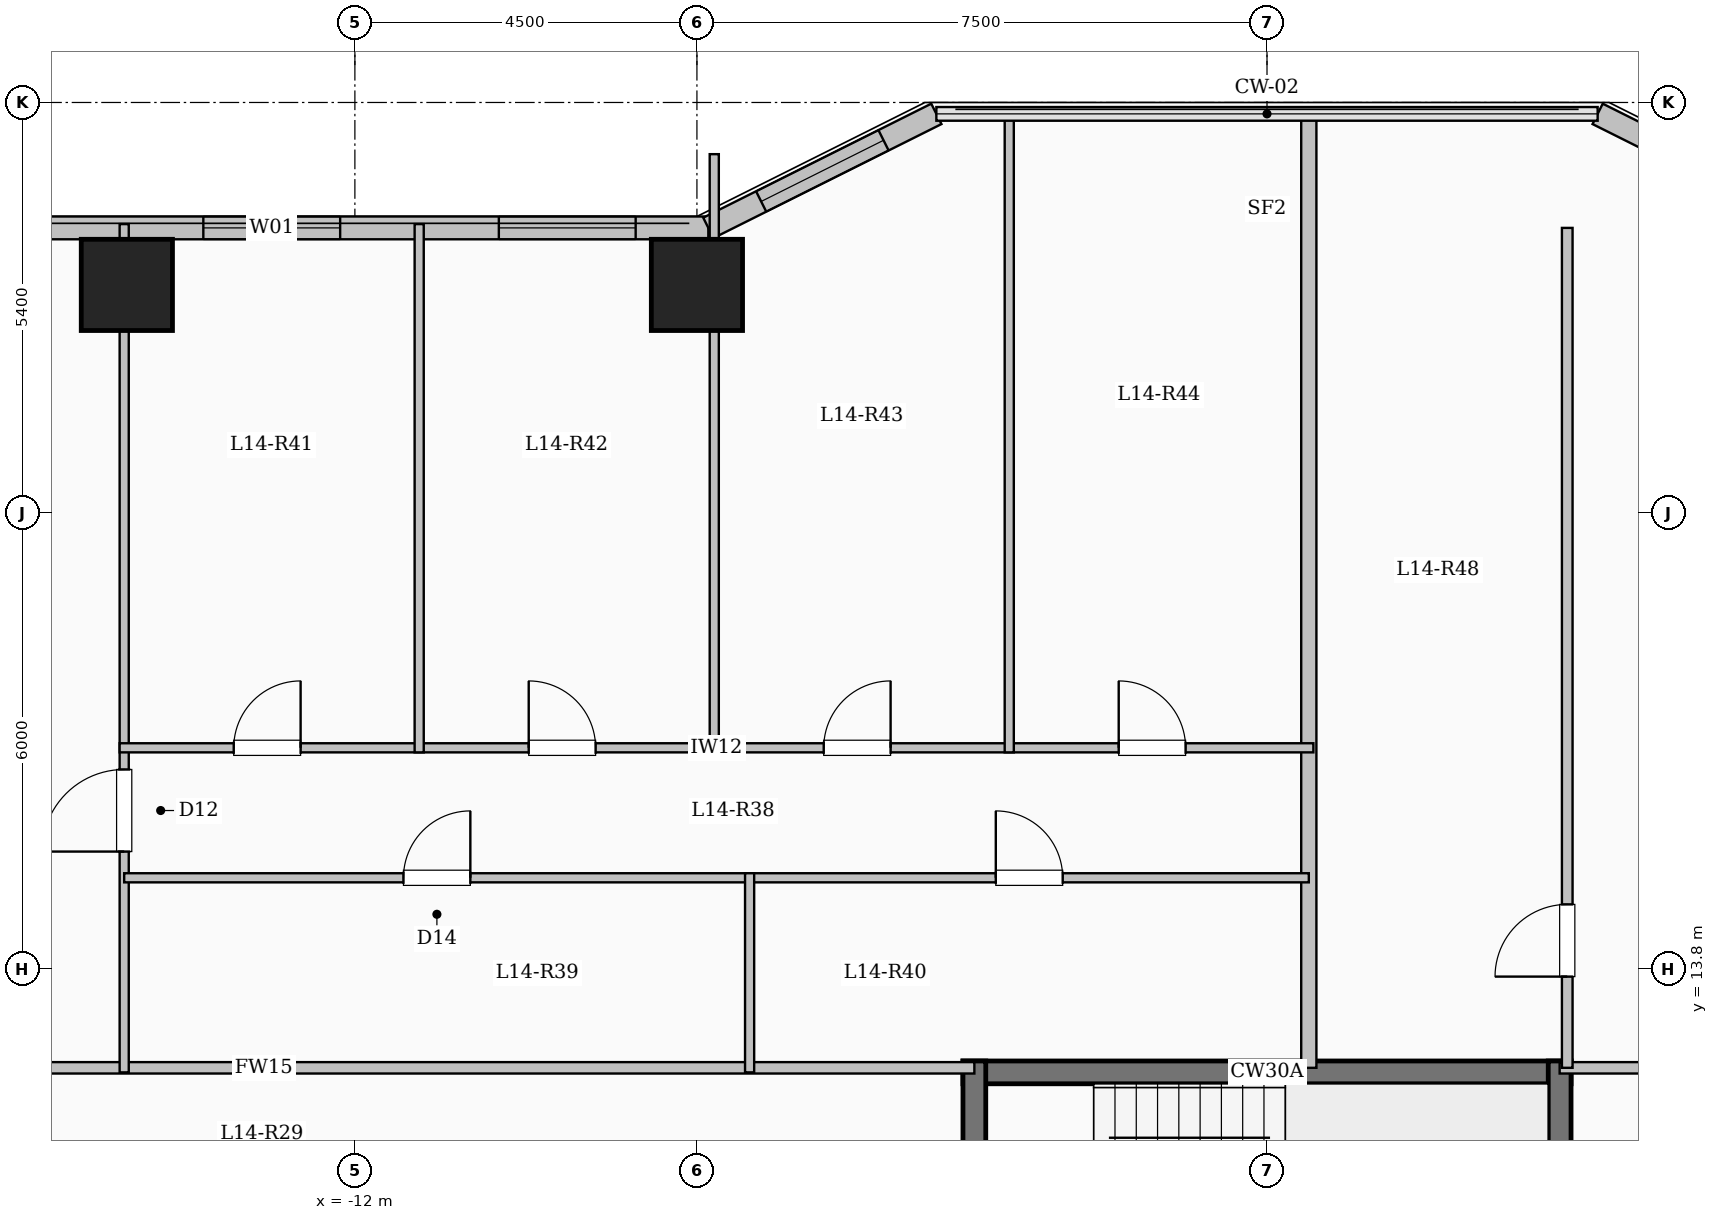
"""IFC4 building model, lengths in metres.
Left out: names, types, materials, properties, quantities, classifications, styles, units other than length and angle.
Written with IfcOpenShell. Run it as: python <this file> out.ifc"""

import sys

from ifc_helpers import new_model, si_unit, direction, frame, frame_2d, origin, origin_2d, place, context, subcontext, project, spatial, rectangle, extrude, element, fill, save


model = new_model("IFC4")
c1 = context("Model", 3, precision=1e-05, world=origin(), true_north=direction((0.0, 1.0)))
c2 = subcontext(c1, "Body", "Model", "MODEL_VIEW")
j1 = project(units=[si_unit("LENGTHUNIT", "METRE"), si_unit("PLANEANGLEUNIT", "RADIAN")], contexts=[c1])
p1 = place(None, origin())
s1 = spatial("IfcSite", under=j1, at=p1, CompositionType="ELEMENT")
p2 = place(p1, origin())
s2 = spatial("IfcBuilding", under=s1, at=p2, CompositionType="ELEMENT")
p3 = place(p2, frame((0.0, 0.0, 54.15)))
s3 = spatial("IfcBuildingStorey", under=s2, at=p3, CompositionType="ELEMENT", Elevation=54.15)
for number, where, z_axis, x_axis in (
    (1, (-15.0, 22.8, 0.0), (0.0, 0.0, 1.0), (1.0, 0.0, 0.0)),
    (2, (-7.5, 22.8, 0.0), (0.0, 0.0, 1.0), (1.0, 0.0, 0.0)),
):
    element("IfcColumn", number, at=place(p3, frame(where, z_axis=z_axis, x_axis=x_axis)), inside=s3, PredefinedType="COLUMN", context=c2, shape_type="SweptSolid", body=[
        extrude(rectangle(XDim=1.2, YDim=1.2, at=origin_2d()), origin(), (0.0, 0.0, 1.0), 3.35),
    ])
p4 = place(p3, frame((-22.65, 23.55, 0.0), z_axis=(0.0, 0.0, 1.0), x_axis=(1.0, 0.0, 0.0)))
e3 = element("IfcWall", 3, at=p4, inside=s3, PredefinedType="SOLIDWALL", context=c2, shape_type="SweptSolid", body=[
    extrude(rectangle(XDim=15.3, YDim=0.3, at=frame_2d((7.65, 0.0))), origin(), (0.0, 0.0, 1.0), 3.1),
])
p5 = place(p4, frame((2.637, 0.0, 0.9)))
e4 = element("IfcOpeningElement", 4, at=p5, cuts=e3, PredefinedType="OPENING", context=c2, shape_type="SweptSolid", body=[
    extrude(rectangle(XDim=2.4, YDim=1.8, at=frame_2d((1.2, 0.9))), frame((0.0, 0.16, 0.0), z_axis=(0.0, -1.0, 0.0), x_axis=(1.0, 0.0, 0.0)), (0.0, 0.0, 1.0), 0.32),
])
p6 = place(p4, frame((8.656, 0.0, 0.9)))
e5 = element("IfcOpeningElement", 5, at=p6, cuts=e3, PredefinedType="OPENING", context=c2, shape_type="SweptSolid", body=[
    extrude(rectangle(XDim=1.8, YDim=1.65, at=frame_2d((0.9, 0.825))), frame((0.0, 0.16, 0.0), z_axis=(0.0, -1.0, 0.0), x_axis=(1.0, 0.0, 0.0)), (0.0, 0.0, 1.0), 0.32),
])
p7 = place(p4, frame((12.544, 0.0, 0.9)))
e6 = element("IfcOpeningElement", 6, at=p7, cuts=e3, PredefinedType="OPENING", context=c2, shape_type="SweptSolid", body=[
    extrude(rectangle(XDim=1.8, YDim=1.65, at=frame_2d((0.9, 0.825))), frame((0.0, 0.16, 0.0), z_axis=(0.0, -1.0, 0.0), x_axis=(1.0, 0.0, 0.0)), (0.0, 0.0, 1.0), 0.32),
])
p8 = place(p3, frame((-7.35, 23.55, 0.0), z_axis=(0.0, 0.0, 1.0), x_axis=(0.894427191, 0.4472135955, 0.0)))
e7 = element("IfcWall", 7, at=p8, inside=s3, PredefinedType="SOLIDWALL", context=c2, shape_type="SweptSolid", body=[
    extrude(rectangle(XDim=3.354, YDim=0.3, at=frame_2d((1.677, 0.0))), origin(), (0.0, 0.0, 1.0), 3.1),
])
p9 = place(p8, frame((0.777, 0.0, 0.9)))
e8 = element("IfcOpeningElement", 8, at=p9, cuts=e7, PredefinedType="OPENING", context=c2, shape_type="SweptSolid", body=[
    extrude(rectangle(XDim=1.8, YDim=1.65, at=frame_2d((0.9, 0.825))), frame((0.0, 0.16, 0.0), z_axis=(0.0, -1.0, 0.0), x_axis=(1.0, 0.0, 0.0)), (0.0, 0.0, 1.0), 0.32),
])
p10 = place(p3, frame((4.35, 25.05, 0.0), z_axis=(0.0, 0.0, 1.0), x_axis=(0.894427191, -0.4472135955, 0.0)))
e9 = element("IfcWall", 9, at=p10, inside=s3, PredefinedType="SOLIDWALL", context=c2, shape_type="SweptSolid", body=[
    extrude(rectangle(XDim=3.354, YDim=0.3, at=frame_2d((1.677, 0.0))), origin(), (0.0, 0.0, 1.0), 3.1),
])
p11 = place(p10, frame((1.653, 0.0, 0.95)))
e10 = element("IfcOpeningElement", 10, at=p11, cuts=e9, PredefinedType="OPENING", context=c2, shape_type="SweptSolid", body=[
    extrude(rectangle(XDim=1.2, YDim=1.5, at=frame_2d((0.6, 0.75))), frame((0.0, 0.16, 0.0), z_axis=(0.0, -1.0, 0.0), x_axis=(1.0, 0.0, 0.0)), (0.0, 0.0, 1.0), 0.32),
])
p12 = place(p3, frame((-4.0, 12.44, 0.0), z_axis=(0.0, 0.0, 1.0), x_axis=(1.0, 0.0, 0.0)))
e11 = element("IfcWall", 11, at=p12, inside=s3, PredefinedType="SHEAR", context=c2, shape_type="SweptSolid", body=[
    extrude(rectangle(XDim=8.0, YDim=0.3, at=frame_2d((4.0, 0.0))), origin(), (0.0, 0.0, 1.0), 3.35),
])
for number, where, z_axis, x_axis in (
    (12, (-3.85, 9.0, 0.0), (0.0, 0.0, 1.0), (0.0, 1.0, 0.0)),
    (13, (3.85, 9.0, 0.0), (0.0, 0.0, 1.0), (0.0, 1.0, 0.0)),
):
    element("IfcWall", number, at=place(p3, frame(where, z_axis=z_axis, x_axis=x_axis)), inside=s3, PredefinedType="SHEAR", context=c2, shape_type="SweptSolid", body=[
        extrude(rectangle(XDim=3.59, YDim=0.3, at=frame_2d((1.795, 0.0))), origin(), (0.0, 0.0, 1.0), 3.35),
    ])
p13 = place(p3, frame((-22.55, 12.5, 0.0), z_axis=(0.0, 0.0, 1.0), x_axis=(1.0, 0.0, 0.0)))
e14 = element("IfcWall", 14, at=p13, inside=s3, PredefinedType="PARTITIONING", context=c2, shape_type="SweptSolid", body=[
    extrude(rectangle(XDim=18.7, YDim=0.15, at=frame_2d((9.35, 0.0))), origin(), (0.0, 0.0, 1.0), 3.1),
])
p14 = place(p13, frame((0.7, 0.0, 0.0)))
e15 = element("IfcOpeningElement", 15, at=p14, cuts=e14, PredefinedType="OPENING", context=c2, shape_type="SweptSolid", body=[
    extrude(rectangle(XDim=0.96, YDim=2.15, at=frame_2d((0.48, 1.075))), frame((0.0, 0.085, 0.0), z_axis=(0.0, -1.0, 0.0), x_axis=(1.0, 0.0, 0.0)), (0.0, 0.0, 1.0), 0.17),
])
p15 = place(p3, frame((3.85, 12.5, 0.0), z_axis=(0.0, 0.0, 1.0), x_axis=(1.0, 0.0, 0.0)))
e16 = element("IfcWall", 16, at=p15, inside=s3, PredefinedType="PARTITIONING", context=c2, shape_type="SweptSolid", body=[
    extrude(rectangle(XDim=18.7, YDim=0.15, at=frame_2d((9.35, 0.0))), origin(), (0.0, 0.0, 1.0), 3.1),
])
p16 = place(p15, frame((2.942, 0.0, 0.0)))
e17 = element("IfcOpeningElement", 17, at=p16, cuts=e16, PredefinedType="OPENING", context=c2, shape_type="SweptSolid", body=[
    extrude(rectangle(XDim=0.95, YDim=2.15, at=frame_2d((0.475, 1.075))), frame((0.0, 0.085, 0.0), z_axis=(0.0, -1.0, 0.0), x_axis=(1.0, 0.0, 0.0)), (0.0, 0.0, 1.0), 0.17),
])
p17 = place(p15, frame((9.647, 0.0, 0.0)))
e18 = element("IfcOpeningElement", 18, at=p17, cuts=e16, PredefinedType="OPENING", context=c2, shape_type="SweptSolid", body=[
    extrude(rectangle(XDim=0.95, YDim=2.15, at=frame_2d((0.475, 1.075))), frame((0.0, 0.085, 0.0), z_axis=(0.0, -1.0, 0.0), x_axis=(1.0, 0.0, 0.0)), (0.0, 0.0, 1.0), 0.17),
])
p18 = place(p15, frame((15.61, 0.0, 0.0)))
e19 = element("IfcOpeningElement", 19, at=p18, cuts=e16, PredefinedType="OPENING", context=c2, shape_type="SweptSolid", body=[
    extrude(rectangle(XDim=0.95, YDim=2.15, at=frame_2d((0.475, 1.075))), frame((0.0, 0.085, 0.0), z_axis=(0.0, -1.0, 0.0), x_axis=(1.0, 0.0, 0.0)), (0.0, 0.0, 1.0), 0.17),
])
p19 = place(p3, frame((0.55, 12.5, 0.0), z_axis=(0.0, 0.0, 1.0), x_axis=(0.0, 1.0, 0.0)))
e20 = element("IfcWall", 20, at=p19, inside=s3, PredefinedType="SOLIDWALL", context=c2, shape_type="SweptSolid", body=[
    extrude(rectangle(XDim=12.58, YDim=0.2, at=frame_2d((6.29, 0.0))), origin(), (0.0, 0.0, 1.0), 3.1),
])
p20 = place(p3, frame((-15.035, 12.44, 0.0), z_axis=(0.0, 0.0, 1.0), x_axis=(0.0, 1.0, 0.0)))
e21 = element("IfcWall", 21, at=p20, inside=s3, PredefinedType="PARTITIONING", context=c2, shape_type="SweptSolid", body=[
    extrude(rectangle(XDim=11.16, YDim=0.12, at=frame_2d((5.58, 0.0))), origin(), (0.0, 0.0, 1.0), 2.435),
])
p21 = place(p20, frame((2.905, 0.0, 0.0)))
e22 = element("IfcOpeningElement", 22, at=p21, cuts=e21, PredefinedType="OPENING", context=c2, shape_type="SweptSolid", body=[
    extrude(rectangle(XDim=1.08, YDim=2.15, at=frame_2d((0.54, 1.075))), frame((0.0, 0.07, 0.0), z_axis=(0.0, -1.0, 0.0), x_axis=(1.0, 0.0, 0.0)), (0.0, 0.0, 1.0), 0.14),
])
p22 = place(p3, frame((-15.035, 15.0, 0.0), z_axis=(0.0, 0.0, 1.0), x_axis=(1.0, 0.0, 0.0)))
e23 = element("IfcWall", 23, at=p22, inside=s3, PredefinedType="PARTITIONING", context=c2, shape_type="SweptSolid", body=[
    extrude(rectangle(XDim=8.228, YDim=0.12, at=frame_2d((4.114, 0.0))), origin(), (0.0, 0.0, 1.0), 2.585),
])
p23 = place(p22, frame((3.674, 0.0, 0.0)))
e24 = element("IfcOpeningElement", 24, at=p23, cuts=e23, PredefinedType="OPENING", context=c2, shape_type="SweptSolid", body=[
    extrude(rectangle(XDim=0.88, YDim=2.1, at=frame_2d((0.44, 1.05))), frame((0.0, 0.07, 0.0), z_axis=(0.0, -1.0, 0.0), x_axis=(1.0, 0.0, 0.0)), (0.0, 0.0, 1.0), 0.14),
])
p24 = place(p3, frame((-6.807, 15.0, 0.0), z_axis=(0.0, 0.0, 1.0), x_axis=(1.0, 0.0, 0.0)))
e25 = element("IfcWall", 25, at=p24, inside=s3, PredefinedType="PARTITIONING", context=c2, shape_type="SweptSolid", body=[
    extrude(rectangle(XDim=7.357, YDim=0.12, at=frame_2d((3.678, 0.0))), origin(), (0.0, 0.0, 1.0), 2.585),
])
p25 = place(p24, frame((3.239, 0.0, 0.0)))
e26 = element("IfcOpeningElement", 26, at=p25, cuts=e25, PredefinedType="OPENING", context=c2, shape_type="SweptSolid", body=[
    extrude(rectangle(XDim=0.88, YDim=2.1, at=frame_2d((0.44, 1.05))), frame((0.0, 0.07, 0.0), z_axis=(0.0, -1.0, 0.0), x_axis=(1.0, 0.0, 0.0)), (0.0, 0.0, 1.0), 0.14),
])
p26 = place(p3, frame((-15.095, 16.71, 0.0), z_axis=(0.0, 0.0, 1.0), x_axis=(1.0, 0.0, 0.0)))
e27 = element("IfcWall", 27, at=p26, inside=s3, PredefinedType="PARTITIONING", context=c2, shape_type="SweptSolid", body=[
    extrude(rectangle(XDim=15.705, YDim=0.12, at=frame_2d((7.853, 0.0))), origin(), (0.0, 0.0, 1.0), 2.585),
])
p27 = place(p26, frame((1.501, 0.0, 0.0)))
e28 = element("IfcOpeningElement", 28, at=p27, cuts=e27, PredefinedType="OPENING", context=c2, shape_type="SweptSolid", body=[
    extrude(rectangle(XDim=0.88, YDim=2.1, at=frame_2d((0.44, 1.05))), frame((0.0, 0.07, 0.0), z_axis=(0.0, -1.0, 0.0), x_axis=(1.0, 0.0, 0.0)), (0.0, 0.0, 1.0), 0.14),
])
p28 = place(p26, frame((5.382, 0.0, 0.0)))
e29 = element("IfcOpeningElement", 29, at=p28, cuts=e27, PredefinedType="OPENING", context=c2, shape_type="SweptSolid", body=[
    extrude(rectangle(XDim=0.88, YDim=2.1, at=frame_2d((0.44, 1.05))), frame((0.0, 0.07, 0.0), z_axis=(0.0, -1.0, 0.0), x_axis=(1.0, 0.0, 0.0)), (0.0, 0.0, 1.0), 0.14),
])
p29 = place(p26, frame((9.263, 0.0, 0.0)))
e30 = element("IfcOpeningElement", 30, at=p29, cuts=e27, PredefinedType="OPENING", context=c2, shape_type="SweptSolid", body=[
    extrude(rectangle(XDim=0.88, YDim=2.1, at=frame_2d((0.44, 1.05))), frame((0.0, 0.07, 0.0), z_axis=(0.0, -1.0, 0.0), x_axis=(1.0, 0.0, 0.0)), (0.0, 0.0, 1.0), 0.14),
])
p30 = place(p26, frame((13.144, 0.0, 0.0)))
e31 = element("IfcOpeningElement", 31, at=p30, cuts=e27, PredefinedType="OPENING", context=c2, shape_type="SweptSolid", body=[
    extrude(rectangle(XDim=0.88, YDim=2.1, at=frame_2d((0.44, 1.05))), frame((0.0, 0.07, 0.0), z_axis=(0.0, -1.0, 0.0), x_axis=(1.0, 0.0, 0.0)), (0.0, 0.0, 1.0), 0.14),
])
p31 = place(p3, frame((-6.807, 12.44, 0.0), z_axis=(0.0, 0.0, 1.0), x_axis=(0.0, 1.0, 0.0)))
e32 = element("IfcWall", 32, at=p31, inside=s3, PredefinedType="PARTITIONING", context=c2, shape_type="SweptSolid", body=[
    extrude(rectangle(XDim=2.62, YDim=0.12, at=frame_2d((1.31, 0.0))), origin(), (0.0, 0.0, 1.0), 3.1),
])
p32 = place(p3, frame((-11.154, 16.65, 0.0), z_axis=(0.0, 0.0, 1.0), x_axis=(0.0, 1.0, 0.0)))
e33 = element("IfcWall", 33, at=p32, inside=s3, PredefinedType="PARTITIONING", context=c2, shape_type="SweptSolid", body=[
    extrude(rectangle(XDim=6.95, YDim=0.12, at=frame_2d((3.475, 0.0))), origin(), (0.0, 0.0, 1.0), 3.1),
])
p33 = place(p3, frame((-7.272, 16.65, 0.0), z_axis=(0.0, 0.0, 1.0), x_axis=(0.0, 1.0, 0.0)))
e34 = element("IfcWall", 34, at=p33, inside=s3, PredefinedType="PARTITIONING", context=c2, shape_type="SweptSolid", body=[
    extrude(rectangle(XDim=7.87, YDim=0.12, at=frame_2d((3.935, 0.0))), origin(), (0.0, 0.0, 1.0), 2.435),
])
p34 = place(p3, frame((-3.391, 16.65, 0.0), z_axis=(0.0, 0.0, 1.0), x_axis=(0.0, 1.0, 0.0)))
e35 = element("IfcWall", 35, at=p34, inside=s3, PredefinedType="PARTITIONING", context=c2, shape_type="SweptSolid", body=[
    extrude(rectangle(XDim=8.43, YDim=0.12, at=frame_2d((4.215, 0.0))), origin(), (0.0, 0.0, 1.0), 3.1),
])
p35 = place(p3, frame((3.95, 12.5, 0.0), z_axis=(0.0, 0.0, 1.0), x_axis=(0.0, 1.0, 0.0)))
e36 = element("IfcWall", 36, at=p35, inside=s3, PredefinedType="PARTITIONING", context=c2, shape_type="SweptSolid", body=[
    extrude(rectangle(XDim=11.05, YDim=0.14, at=frame_2d((5.525, 0.0))), origin(), (0.0, 0.0, 1.0), 3.1),
])
p36 = place(p35, frame((1.2, 0.0, 0.0)))
e37 = element("IfcOpeningElement", 37, at=p36, cuts=e36, PredefinedType="OPENING", context=c2, shape_type="SweptSolid", body=[
    extrude(rectangle(XDim=0.95, YDim=2.15, at=frame_2d((0.475, 1.075))), frame((0.0, 0.08, 0.0), z_axis=(0.0, -1.0, 0.0), x_axis=(1.0, 0.0, 0.0)), (0.0, 0.0, 1.0), 0.16),
])
p37 = place(p6, origin())
e38 = element("IfcWindow", 38, at=p37, inside=s3, PartitioningType="SINGLE_PANEL", PredefinedType="WINDOW", context=c2, shape_type="SweptSolid", body=[
    extrude(rectangle(XDim=1.8, YDim=1.65, at=frame_2d((0.9, 0.825))), frame((0.0, 0.03, 0.0), z_axis=(0.0, -1.0, 0.0), x_axis=(1.0, 0.0, 0.0)), (0.0, 0.0, 1.0), 0.06),
])
fill(e5, e38)
p38 = place(p7, origin())
e39 = element("IfcWindow", 39, at=p38, inside=s3, PartitioningType="SINGLE_PANEL", PredefinedType="WINDOW", context=c2, shape_type="SweptSolid", body=[
    extrude(rectangle(XDim=1.8, YDim=1.65, at=frame_2d((0.9, 0.825))), frame((0.0, 0.03, 0.0), z_axis=(0.0, -1.0, 0.0), x_axis=(1.0, 0.0, 0.0)), (0.0, 0.0, 1.0), 0.06),
])
fill(e6, e39)
p39 = place(p9, origin())
e40 = element("IfcWindow", 40, at=p39, inside=s3, PartitioningType="SINGLE_PANEL", PredefinedType="WINDOW", context=c2, shape_type="SweptSolid", body=[
    extrude(rectangle(XDim=1.8, YDim=1.65, at=frame_2d((0.9, 0.825))), frame((0.0, 0.03, 0.0), z_axis=(0.0, -1.0, 0.0), x_axis=(1.0, 0.0, 0.0)), (0.0, 0.0, 1.0), 0.06),
])
fill(e8, e40)
p40 = place(p21, origin())
e41 = element("IfcDoor", 41, at=p40, inside=s3, OperationType="SINGLE_SWING_LEFT", PredefinedType="DOOR", context=c2, shape_type="SweptSolid", body=[
    extrude(rectangle(XDim=1.08, YDim=2.15, at=frame_2d((0.54, 1.075))), frame((0.0, 0.025, 0.0), z_axis=(0.0, -1.0, 0.0), x_axis=(1.0, 0.0, 0.0)), (0.0, 0.0, 1.0), 0.05),
])
fill(e22, e41)
p41 = place(p23, origin())
e42 = element("IfcDoor", 42, at=p41, inside=s3, OperationType="SINGLE_SWING_RIGHT", PredefinedType="DOOR", context=c2, shape_type="SweptSolid", body=[
    extrude(rectangle(XDim=0.88, YDim=2.1, at=frame_2d((0.44, 1.05))), frame((0.0, 0.025, 0.0), z_axis=(0.0, -1.0, 0.0), x_axis=(1.0, 0.0, 0.0)), (0.0, 0.0, 1.0), 0.05),
])
fill(e24, e42)
p42 = place(p25, origin())
e43 = element("IfcDoor", 43, at=p42, inside=s3, OperationType="SINGLE_SWING_LEFT", PredefinedType="DOOR", context=c2, shape_type="SweptSolid", body=[
    extrude(rectangle(XDim=0.88, YDim=2.1, at=frame_2d((0.44, 1.05))), frame((0.0, 0.025, 0.0), z_axis=(0.0, -1.0, 0.0), x_axis=(1.0, 0.0, 0.0)), (0.0, 0.0, 1.0), 0.05),
])
fill(e26, e43)
p43 = place(p27, origin())
e44 = element("IfcDoor", 44, at=p43, inside=s3, OperationType="SINGLE_SWING_RIGHT", PredefinedType="DOOR", context=c2, shape_type="SweptSolid", body=[
    extrude(rectangle(XDim=0.88, YDim=2.1, at=frame_2d((0.44, 1.05))), frame((0.0, 0.025, 0.0), z_axis=(0.0, -1.0, 0.0), x_axis=(1.0, 0.0, 0.0)), (0.0, 0.0, 1.0), 0.05),
])
fill(e28, e44)
p44 = place(p28, origin())
e45 = element("IfcDoor", 45, at=p44, inside=s3, OperationType="SINGLE_SWING_LEFT", PredefinedType="DOOR", context=c2, shape_type="SweptSolid", body=[
    extrude(rectangle(XDim=0.88, YDim=2.1, at=frame_2d((0.44, 1.05))), frame((0.0, 0.025, 0.0), z_axis=(0.0, -1.0, 0.0), x_axis=(1.0, 0.0, 0.0)), (0.0, 0.0, 1.0), 0.05),
])
fill(e29, e45)
p45 = place(p29, origin())
e46 = element("IfcDoor", 46, at=p45, inside=s3, OperationType="SINGLE_SWING_RIGHT", PredefinedType="DOOR", context=c2, shape_type="SweptSolid", body=[
    extrude(rectangle(XDim=0.88, YDim=2.1, at=frame_2d((0.44, 1.05))), frame((0.0, 0.025, 0.0), z_axis=(0.0, -1.0, 0.0), x_axis=(1.0, 0.0, 0.0)), (0.0, 0.0, 1.0), 0.05),
])
fill(e30, e46)
p46 = place(p30, origin())
e47 = element("IfcDoor", 47, at=p46, inside=s3, OperationType="SINGLE_SWING_LEFT", PredefinedType="DOOR", context=c2, shape_type="SweptSolid", body=[
    extrude(rectangle(XDim=0.88, YDim=2.1, at=frame_2d((0.44, 1.05))), frame((0.0, 0.025, 0.0), z_axis=(0.0, -1.0, 0.0), x_axis=(1.0, 0.0, 0.0)), (0.0, 0.0, 1.0), 0.05),
])
fill(e31, e47)
p47 = place(p36, origin())
e48 = element("IfcDoor", 48, at=p47, inside=s3, OperationType="SINGLE_SWING_LEFT", PredefinedType="DOOR", context=c2, shape_type="SweptSolid", body=[
    extrude(rectangle(XDim=0.95, YDim=2.15, at=frame_2d((0.475, 1.075))), frame((0.0, 0.025, 0.0), z_axis=(0.0, -1.0, 0.0), x_axis=(1.0, 0.0, 0.0)), (0.0, 0.0, 1.0), 0.05),
])
fill(e37, e48)
save(model, sys.argv[1])
